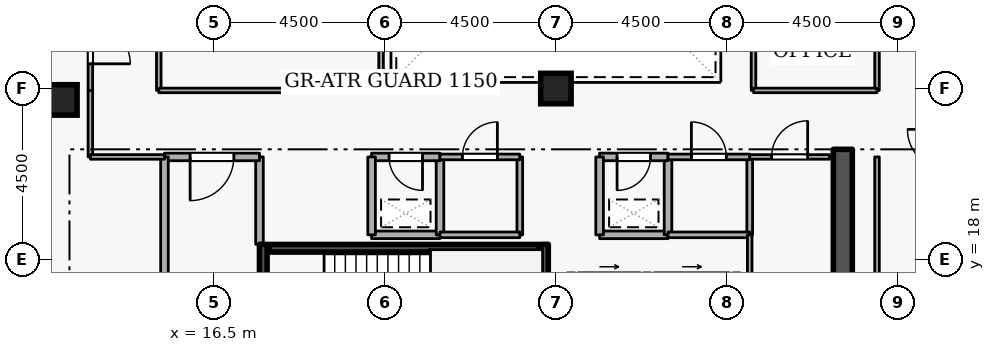
"""IFC4 building model, lengths in metres.
Left out: names, types, materials, properties, quantities, classifications, styles, units other than length and angle.
Written with IfcOpenShell. Run it as: python <this file> out.ifc"""

import sys

from ifc_helpers import new_model, si_unit, direction, frame, frame_2d, origin, origin_2d, place, context, subcontext, project, spatial, rectangle, extrude, element, fill, save


model = new_model("IFC4")
c1 = context("Model", 3, precision=1e-05, world=origin(), true_north=direction((0.0, 1.0)))
c2 = subcontext(c1, "Body", "Model", "MODEL_VIEW")
j1 = project(units=[si_unit("LENGTHUNIT", "METRE"), si_unit("PLANEANGLEUNIT", "RADIAN")], contexts=[c1])
p1 = place(None, origin())
s1 = spatial("IfcSite", under=j1, at=p1, CompositionType="ELEMENT")
p2 = place(p1, origin())
s2 = spatial("IfcBuilding", under=s1, at=p2, CompositionType="ELEMENT")
p3 = place(p2, frame((0.0, 0.0, 258.3)))
s3 = spatial("IfcBuildingStorey", under=s2, at=p3, CompositionType="ELEMENT", Elevation=258.3)
p4 = place(p3, frame((33.05, 15.1, 0.0), z_axis=(0.0, 0.0, 1.0), x_axis=(0.0, 1.0, 0.0)))
e1 = element("IfcWall", 1, at=p4, inside=s3, PredefinedType="SHEAR", context=c2, shape_type="SweptSolid", body=[
    extrude(rectangle(XDim=5.8, YDim=0.5, at=frame_2d((2.9, 0.0))), origin(), (0.0, 0.0, 1.0), 3.6),
])
for number, where, z_axis, x_axis in (
    (2, (12.5, 22.2, 0.0), (0.0, 0.0, 1.0), (1.0, 0.0, 0.0)),
    (3, (25.5, 22.5, 0.0), (0.0, 0.0, 1.0), (1.0, 0.0, 0.0)),
):
    element("IfcColumn", number, at=place(p3, frame(where, z_axis=z_axis, x_axis=x_axis)), inside=s3, PredefinedType="COLUMN", context=c2, shape_type="SweptSolid", body=[
        extrude(rectangle(XDim=0.8, YDim=0.8, at=origin_2d()), origin(), (0.0, 0.0, 1.0), 3.6),
    ])
p5 = place(p3, frame((26.08, 17.55, 0.0), z_axis=(0.0, 0.0, 1.0), x_axis=(1.0, 0.0, 0.0)))
e4 = element("IfcWall", 4, at=p5, inside=s3, PredefinedType="STANDARD", context=c2, shape_type="SweptSolid", body=[
    extrude(rectangle(XDim=1.64, YDim=0.2, at=frame_2d((0.82, 0.0))), origin(), (0.0, 0.0, 1.0), 3.34),
])
p6 = place(p5, frame((0.31, 0.0, 0.0)))
e5 = element("IfcOpeningElement", 5, at=p6, cuts=e4, PredefinedType="OPENING", context=c2, shape_type="SweptSolid", body=[
    extrude(rectangle(XDim=1.02, YDim=2.06, at=frame_2d((0.51, 1.03))), frame((0.0, 0.11, 0.0), z_axis=(0.0, -1.0, 0.0), x_axis=(1.0, 0.0, 0.0)), (0.0, 0.0, 1.0), 0.22),
])
p7 = place(p3, frame((28.08, 17.55, 0.0), z_axis=(0.0, 0.0, 1.0), x_axis=(1.0, 0.0, 0.0)))
e6 = element("IfcWall", 6, at=p7, inside=s3, PredefinedType="STANDARD", context=c2, shape_type="SweptSolid", body=[
    extrude(rectangle(XDim=1.99, YDim=0.2, at=frame_2d((0.995, 0.0))), origin(), (0.0, 0.0, 1.0), 3.34),
])
p8 = place(p7, frame((0.485, 0.0, 0.0)))
e7 = element("IfcOpeningElement", 7, at=p8, cuts=e6, PredefinedType="OPENING", context=c2, shape_type="SweptSolid", body=[
    extrude(rectangle(XDim=1.02, YDim=2.06, at=frame_2d((0.51, 1.03))), frame((0.0, 0.11, 0.0), z_axis=(0.0, -1.0, 0.0), x_axis=(1.0, 0.0, 0.0)), (0.0, 0.0, 1.0), 0.22),
])
p9 = place(p3, frame((17.8, 15.05, 0.0), z_axis=(0.0, 0.0, 1.0), x_axis=(0.0, 1.0, 0.0)))
e8 = element("IfcWall", 8, at=p9, inside=s3, PredefinedType="SHEAR", context=c2, shape_type="SweptSolid", body=[
    extrude(rectangle(XDim=3.35, YDim=0.2, at=frame_2d((1.675, 0.0))), origin(), (0.0, 0.0, 1.0), 3.6),
])
p10 = place(p9, frame((1.125, 0.0, 0.0)))
e9 = element("IfcOpeningElement", 9, at=p10, cuts=e8, PredefinedType="OPENING", context=c2, shape_type="SweptSolid", body=[
    extrude(rectangle(XDim=1.1, YDim=2.1, at=frame_2d((0.55, 1.05))), frame((0.0, 0.11, 0.0), z_axis=(0.0, -1.0, 0.0), x_axis=(1.0, 0.0, 0.0)), (0.0, 0.0, 1.0), 0.22),
])
p11 = place(p3, frame((25.2, 18.4, 0.0), z_axis=(0.0, 0.0, 1.0), x_axis=(0.0, -1.0, 0.0)))
e10 = element("IfcWall", 10, at=p11, inside=s3, PredefinedType="SHEAR", context=c2, shape_type="SweptSolid", body=[
    extrude(rectangle(XDim=3.35, YDim=0.2, at=frame_2d((1.675, 0.0))), origin(), (0.0, 0.0, 1.0), 3.6),
])
p12 = place(p3, frame((25.05, 18.297, 0.0), z_axis=(0.0, 0.0, 1.0), x_axis=(-1.0, 0.0, 0.0)))
e11 = element("IfcWall", 11, at=p12, inside=s3, PredefinedType="SHEAR", context=c2, shape_type="SweptSolid", body=[
    extrude(rectangle(XDim=7.1, YDim=0.2, at=frame_2d((3.55, 0.0))), origin(), (0.0, 0.0, 1.0), 3.6),
])
p13 = place(p3, frame((17.7, 18.4, 0.0), z_axis=(0.0, 0.0, 1.0), x_axis=(0.0, 1.0, 0.0)))
e12 = element("IfcWall", 12, at=p13, inside=s3, PredefinedType="STANDARD", context=c2, shape_type="SweptSolid", body=[
    extrude(rectangle(XDim=2.3, YDim=0.2, at=frame_2d((1.15, 0.0))), origin(), (0.0, 0.0, 1.0), 2.545),
])
p14 = place(p3, frame((17.7, 20.7, 0.0), z_axis=(0.0, 0.0, 1.0), x_axis=(-1.0, 0.0, 0.0)))
e13 = element("IfcWall", 13, at=p14, inside=s3, PredefinedType="STANDARD", context=c2, shape_type="SweptSolid", body=[
    extrude(rectangle(XDim=2.5, YDim=0.2, at=frame_2d((1.25, 0.0))), origin(), (0.0, 0.0, 1.0), 3.34),
])
p15 = place(p14, frame((0.675, 0.0, 0.0)))
e14 = element("IfcOpeningElement", 14, at=p15, cuts=e13, PredefinedType="OPENING", context=c2, shape_type="SweptSolid", body=[
    extrude(rectangle(XDim=1.15, YDim=2.1, at=frame_2d((0.575, 1.05))), frame((0.0, 0.11, 0.0), z_axis=(0.0, -1.0, 0.0), x_axis=(1.0, 0.0, 0.0)), (0.0, 0.0, 1.0), 0.22),
])
p16 = place(p3, frame((15.2, 20.7, 0.0), z_axis=(0.0, 0.0, 1.0), x_axis=(0.0, -1.0, 0.0)))
e15 = element("IfcWall", 15, at=p16, inside=s3, PredefinedType="STANDARD", context=c2, shape_type="SweptSolid", body=[
    extrude(rectangle(XDim=5.7, YDim=0.2, at=frame_2d((2.85, 0.0))), origin(), (0.0, 0.0, 1.0), 3.34),
])
p17 = place(p3, frame((26.65, 18.65, 0.0), z_axis=(0.0, 0.0, 1.0), x_axis=(1.0, 0.0, 0.0)))
e16 = element("IfcWall", 16, at=p17, inside=s3, PredefinedType="STANDARD", context=c2, shape_type="SweptSolid", body=[
    extrude(rectangle(XDim=1.8, YDim=0.2, at=frame_2d((0.9, 0.0))), origin(), (0.0, 0.0, 1.0), 3.34),
])
p18 = place(p3, frame((28.45, 18.65, 0.0), z_axis=(0.0, 0.0, 1.0), x_axis=(0.0, 1.0, 0.0)))
e17 = element("IfcWall", 17, at=p18, inside=s3, PredefinedType="STANDARD", context=c2, shape_type="SweptSolid", body=[
    extrude(rectangle(XDim=2.05, YDim=0.2, at=frame_2d((1.025, 0.0))), origin(), (0.0, 0.0, 1.0), 3.34),
])
p19 = place(p3, frame((28.45, 20.7, 0.0), z_axis=(0.0, 0.0, 1.0), x_axis=(-1.0, 0.0, 0.0)))
e18 = element("IfcWall", 18, at=p19, inside=s3, PredefinedType="STANDARD", context=c2, shape_type="SweptSolid", body=[
    extrude(rectangle(XDim=1.8, YDim=0.2, at=frame_2d((0.9, 0.0))), origin(), (0.0, 0.0, 1.0), 3.34),
])
p20 = place(p19, frame((0.46, 0.0, 0.0)))
e19 = element("IfcOpeningElement", 19, at=p20, cuts=e18, PredefinedType="OPENING", context=c2, shape_type="SweptSolid", body=[
    extrude(rectangle(XDim=0.88, YDim=2.04, at=frame_2d((0.44, 1.02))), frame((0.0, 0.11, 0.0), z_axis=(0.0, -1.0, 0.0), x_axis=(1.0, 0.0, 0.0)), (0.0, 0.0, 1.0), 0.22),
])
p21 = place(p3, frame((26.65, 20.7, 0.0), z_axis=(0.0, 0.0, 1.0), x_axis=(0.0, -1.0, 0.0)))
e20 = element("IfcWall", 20, at=p21, inside=s3, PredefinedType="STANDARD", context=c2, shape_type="SweptSolid", body=[
    extrude(rectangle(XDim=2.05, YDim=0.2, at=frame_2d((1.025, 0.0))), origin(), (0.0, 0.0, 1.0), 3.34),
])
p22 = place(p3, frame((20.65, 18.65, 0.0), z_axis=(0.0, 0.0, 1.0), x_axis=(1.0, 0.0, 0.0)))
e21 = element("IfcWall", 21, at=p22, inside=s3, PredefinedType="STANDARD", context=c2, shape_type="SweptSolid", body=[
    extrude(rectangle(XDim=1.8, YDim=0.2, at=frame_2d((0.9, 0.0))), origin(), (0.0, 0.0, 1.0), 3.34),
])
p23 = place(p3, frame((22.45, 18.65, 0.0), z_axis=(0.0, 0.0, 1.0), x_axis=(0.0, 1.0, 0.0)))
e22 = element("IfcWall", 22, at=p23, inside=s3, PredefinedType="STANDARD", context=c2, shape_type="SweptSolid", body=[
    extrude(rectangle(XDim=2.05, YDim=0.2, at=frame_2d((1.025, 0.0))), origin(), (0.0, 0.0, 1.0), 3.34),
])
p24 = place(p3, frame((22.45, 20.7, 0.0), z_axis=(0.0, 0.0, 1.0), x_axis=(-1.0, 0.0, 0.0)))
e23 = element("IfcWall", 23, at=p24, inside=s3, PredefinedType="STANDARD", context=c2, shape_type="SweptSolid", body=[
    extrude(rectangle(XDim=1.8, YDim=0.2, at=frame_2d((0.9, 0.0))), origin(), (0.0, 0.0, 1.0), 3.34),
])
p25 = place(p24, frame((0.46, 0.0, 0.0)))
e24 = element("IfcOpeningElement", 24, at=p25, cuts=e23, PredefinedType="OPENING", context=c2, shape_type="SweptSolid", body=[
    extrude(rectangle(XDim=0.88, YDim=2.04, at=frame_2d((0.44, 1.02))), frame((0.0, 0.11, 0.0), z_axis=(0.0, -1.0, 0.0), x_axis=(1.0, 0.0, 0.0)), (0.0, 0.0, 1.0), 0.22),
])
p26 = place(p3, frame((20.65, 20.7, 0.0), z_axis=(0.0, 0.0, 1.0), x_axis=(0.0, -1.0, 0.0)))
e25 = element("IfcWall", 25, at=p26, inside=s3, PredefinedType="STANDARD", context=c2, shape_type="SweptSolid", body=[
    extrude(rectangle(XDim=2.05, YDim=0.2, at=frame_2d((1.025, 0.0))), origin(), (0.0, 0.0, 1.0), 3.34),
])
p27 = place(p3, frame((24.55, 20.7, 0.0), z_axis=(0.0, 0.0, 1.0), x_axis=(0.0, -1.0, 0.0)))
e26 = element("IfcWall", 26, at=p27, inside=s3, PredefinedType="PARTITIONING", context=c2, shape_type="SweptSolid", body=[
    extrude(rectangle(XDim=2.05, YDim=0.15, at=frame_2d((1.025, 0.0))), origin(), (0.0, 0.0, 1.0), 3.34),
])
p28 = place(p3, frame((24.55, 18.65, 0.0), z_axis=(0.0, 0.0, 1.0), x_axis=(-1.0, 0.0, 0.0)))
e27 = element("IfcWall", 27, at=p28, inside=s3, PredefinedType="PARTITIONING", context=c2, shape_type="SweptSolid", body=[
    extrude(rectangle(XDim=2.1, YDim=0.15, at=frame_2d((1.05, 0.0))), origin(), (0.0, 0.0, 1.0), 3.34),
])
p29 = place(p3, frame((22.45, 20.7, 0.0), z_axis=(0.0, 0.0, 1.0), x_axis=(1.0, 0.0, 0.0)))
e28 = element("IfcWall", 28, at=p29, inside=s3, PredefinedType="PARTITIONING", context=c2, shape_type="SweptSolid", body=[
    extrude(rectangle(XDim=2.1, YDim=0.15, at=frame_2d((1.05, 0.0))), origin(), (0.0, 0.0, 1.0), 3.34),
])
p30 = place(p29, frame((0.59, 0.0, 0.0)))
e29 = element("IfcOpeningElement", 29, at=p30, cuts=e28, PredefinedType="OPENING", context=c2, shape_type="SweptSolid", body=[
    extrude(rectangle(XDim=0.92, YDim=2.08, at=frame_2d((0.46, 1.04))), frame((0.0, 0.085, 0.0), z_axis=(0.0, -1.0, 0.0), x_axis=(1.0, 0.0, 0.0)), (0.0, 0.0, 1.0), 0.17),
])
p31 = place(p3, frame((30.6, 20.7, 0.0), z_axis=(0.0, 0.0, 1.0), x_axis=(0.0, -1.0, 0.0)))
e30 = element("IfcWall", 30, at=p31, inside=s3, PredefinedType="PARTITIONING", context=c2, shape_type="SweptSolid", body=[
    extrude(rectangle(XDim=2.05, YDim=0.15, at=frame_2d((1.025, 0.0))), origin(), (0.0, 0.0, 1.0), 3.34),
])
p32 = place(p3, frame((30.6, 18.65, 0.0), z_axis=(0.0, 0.0, 1.0), x_axis=(-1.0, 0.0, 0.0)))
e31 = element("IfcWall", 31, at=p32, inside=s3, PredefinedType="PARTITIONING", context=c2, shape_type="SweptSolid", body=[
    extrude(rectangle(XDim=2.15, YDim=0.15, at=frame_2d((1.075, 0.0))), origin(), (0.0, 0.0, 1.0), 3.34),
])
p33 = place(p3, frame((28.45, 20.7, 0.0), z_axis=(0.0, 0.0, 1.0), x_axis=(1.0, 0.0, 0.0)))
e32 = element("IfcWall", 32, at=p33, inside=s3, PredefinedType="PARTITIONING", context=c2, shape_type="SweptSolid", body=[
    extrude(rectangle(XDim=2.15, YDim=0.15, at=frame_2d((1.075, 0.0))), origin(), (0.0, 0.0, 1.0), 3.34),
])
p34 = place(p33, frame((0.615, 0.0, 0.0)))
e33 = element("IfcOpeningElement", 33, at=p34, cuts=e32, PredefinedType="OPENING", context=c2, shape_type="SweptSolid", body=[
    extrude(rectangle(XDim=0.92, YDim=2.08, at=frame_2d((0.46, 1.04))), frame((0.0, 0.085, 0.0), z_axis=(0.0, -1.0, 0.0), x_axis=(1.0, 0.0, 0.0)), (0.0, 0.0, 1.0), 0.17),
])
p35 = place(p3, frame((30.6, 15.1, 0.0), z_axis=(0.0, 0.0, 1.0), x_axis=(0.0, 1.0, 0.0)))
e34 = element("IfcWall", 34, at=p35, inside=s3, PredefinedType="PARTITIONING", context=c2, shape_type="SweptSolid", body=[
    extrude(rectangle(XDim=3.55, YDim=0.12, at=frame_2d((1.775, 0.0))), origin(), (0.0, 0.0, 1.0), 3.34),
])
p36 = place(p3, frame((30.6, 20.7, 0.0), z_axis=(0.0, 0.0, 1.0), x_axis=(1.0, 0.0, 0.0)))
e35 = element("IfcWall", 35, at=p36, inside=s3, PredefinedType="PARTITIONING", context=c2, shape_type="SweptSolid", body=[
    extrude(rectangle(XDim=2.1, YDim=0.12, at=frame_2d((1.05, 0.0))), origin(), (0.0, 0.0, 1.0), 3.34),
])
p37 = place(p36, frame((0.575, 0.0, 0.0)))
e36 = element("IfcOpeningElement", 36, at=p37, cuts=e35, PredefinedType="OPENING", context=c2, shape_type="SweptSolid", body=[
    extrude(rectangle(XDim=0.95, YDim=2.1, at=frame_2d((0.475, 1.05))), frame((0.0, 0.07, 0.0), z_axis=(0.0, -1.0, 0.0), x_axis=(1.0, 0.0, 0.0)), (0.0, 0.0, 1.0), 0.14),
])
p38 = place(p3, frame((33.95, 20.7, 0.0), z_axis=(0.0, 0.0, 1.0), x_axis=(0.0, -1.0, 0.0)))
e37 = element("IfcWall", 37, at=p38, inside=s3, PredefinedType="PARTITIONING", context=c2, shape_type="SweptSolid", body=[
    extrude(rectangle(XDim=5.9, YDim=0.12, at=frame_2d((2.95, 0.0))), origin(), (0.0, 0.0, 1.0), 3.34),
])
p39 = place(p3, frame((13.25, 24.9, 0.0), z_axis=(0.0, 0.0, 1.0), x_axis=(0.0, -1.0, 0.0)))
e38 = element("IfcWall", 38, at=p39, inside=s3, PredefinedType="PARTITIONING", context=c2, shape_type="SweptSolid", body=[
    extrude(rectangle(XDim=2.45, YDim=0.12, at=frame_2d((1.225, 0.0))), origin(), (0.0, 0.0, 1.0), 3.34),
])
p40 = place(p39, frame((0.7, 0.0, 0.0)))
e39 = element("IfcOpeningElement", 39, at=p40, cuts=e38, PredefinedType="OPENING", context=c2, shape_type="SweptSolid", body=[
    extrude(rectangle(XDim=1.05, YDim=2.1, at=frame_2d((0.525, 1.05))), frame((0.0, 0.07, 0.0), z_axis=(0.0, -1.0, 0.0), x_axis=(1.0, 0.0, 0.0)), (0.0, 0.0, 1.0), 0.14),
])
p41 = place(p3, frame((13.25, 22.45, 0.0), z_axis=(0.0, 0.0, 1.0), x_axis=(0.0, -1.0, 0.0)))
e40 = element("IfcWall", 40, at=p41, inside=s3, PredefinedType="PARTITIONING", context=c2, shape_type="SweptSolid", body=[
    extrude(rectangle(XDim=1.75, YDim=0.12, at=frame_2d((0.875, 0.0))), origin(), (0.0, 0.0, 1.0), 3.34),
])
p42 = place(p3, frame((13.25, 20.7, 0.0), z_axis=(0.0, 0.0, 1.0), x_axis=(1.0, 0.0, 0.0)))
e41 = element("IfcWall", 41, at=p42, inside=s3, PredefinedType="PARTITIONING", context=c2, shape_type="SweptSolid", body=[
    extrude(rectangle(XDim=1.95, YDim=0.12, at=frame_2d((0.975, 0.0))), origin(), (0.0, 0.0, 1.0), 3.34),
])
p43 = place(p3, frame((15.05, 22.45, 0.0), z_axis=(0.0, 0.0, 1.0), x_axis=(0.0, 1.0, 0.0)))
e42 = element("IfcWall", 42, at=p43, inside=s3, PredefinedType="PARTITIONING", context=c2, shape_type="SweptSolid", body=[
    extrude(rectangle(XDim=9.1, YDim=0.12, at=frame_2d((4.55, 0.0))), origin(), (0.0, 0.0, 1.0), 3.34),
])
p44 = place(p43, frame((4.075, 0.0, 0.0)))
e43 = element("IfcOpeningElement", 43, at=p44, cuts=e42, PredefinedType="OPENING", context=c2, shape_type="SweptSolid", body=[
    extrude(rectangle(XDim=0.95, YDim=2.1, at=frame_2d((0.475, 1.05))), frame((0.0, 0.07, 0.0), z_axis=(0.0, -1.0, 0.0), x_axis=(1.0, 0.0, 0.0)), (0.0, 0.0, 1.0), 0.14),
])
p45 = place(p3, frame((20.9, 31.55, 0.0), z_axis=(0.0, 0.0, 1.0), x_axis=(0.0, -1.0, 0.0)))
e44 = element("IfcWall", 44, at=p45, inside=s3, PredefinedType="PARTITIONING", context=c2, shape_type="SweptSolid", body=[
    extrude(rectangle(XDim=9.1, YDim=0.12, at=frame_2d((4.55, 0.0))), origin(), (0.0, 0.0, 1.0), 3.34),
])
p46 = place(p3, frame((20.9, 22.45, 0.0), z_axis=(0.0, 0.0, 1.0), x_axis=(-1.0, 0.0, 0.0)))
e45 = element("IfcWall", 45, at=p46, inside=s3, PredefinedType="PARTITIONING", context=c2, shape_type="SweptSolid", body=[
    extrude(rectangle(XDim=5.85, YDim=0.12, at=frame_2d((2.925, 0.0))), origin(), (0.0, 0.0, 1.0), 3.34),
])
p47 = place(p3, frame((30.7, 22.45, 0.0), z_axis=(0.0, 0.0, 1.0), x_axis=(0.0, 1.0, 0.0)))
e46 = element("IfcWall", 46, at=p47, inside=s3, PredefinedType="PARTITIONING", context=c2, shape_type="SweptSolid", body=[
    extrude(rectangle(XDim=9.1, YDim=0.12, at=frame_2d((4.55, 0.0))), origin(), (0.0, 0.0, 1.0), 3.34),
])
p48 = place(p3, frame((33.95, 31.55, 0.0), z_axis=(0.0, 0.0, 1.0), x_axis=(0.0, -1.0, 0.0)))
e47 = element("IfcWall", 47, at=p48, inside=s3, PredefinedType="PARTITIONING", context=c2, shape_type="SweptSolid", body=[
    extrude(rectangle(XDim=9.1, YDim=0.12, at=frame_2d((4.55, 0.0))), origin(), (0.0, 0.0, 1.0), 3.34),
])
p49 = place(p48, frame((4.075, 0.0, 0.0)))
e48 = element("IfcOpeningElement", 48, at=p49, cuts=e47, PredefinedType="OPENING", context=c2, shape_type="SweptSolid", body=[
    extrude(rectangle(XDim=0.95, YDim=2.1, at=frame_2d((0.475, 1.05))), frame((0.0, 0.07, 0.0), z_axis=(0.0, -1.0, 0.0), x_axis=(1.0, 0.0, 0.0)), (0.0, 0.0, 1.0), 0.14),
])
p50 = place(p3, frame((33.95, 22.45, 0.0), z_axis=(0.0, 0.0, 1.0), x_axis=(-1.0, 0.0, 0.0)))
e49 = element("IfcWall", 49, at=p50, inside=s3, PredefinedType="PARTITIONING", context=c2, shape_type="SweptSolid", body=[
    extrude(rectangle(XDim=3.25, YDim=0.12, at=frame_2d((1.625, 0.0))), origin(), (0.0, 0.0, 1.0), 3.34),
])
p51 = place(p15, origin())
e50 = element("IfcDoor", 50, at=p51, inside=s3, OperationType="SINGLE_SWING_RIGHT", PredefinedType="DOOR", context=c2, shape_type="SweptSolid", body=[
    extrude(rectangle(XDim=1.15, YDim=2.1, at=frame_2d((0.575, 1.05))), frame((0.0, 0.025, 0.0), z_axis=(0.0, -1.0, 0.0), x_axis=(1.0, 0.0, 0.0)), (0.0, 0.0, 1.0), 0.05),
])
fill(e14, e50)
p52 = place(p20, origin())
e51 = element("IfcDoor", 51, at=p52, inside=s3, OperationType="SINGLE_SWING_RIGHT", PredefinedType="DOOR", context=c2, shape_type="SweptSolid", body=[
    extrude(rectangle(XDim=0.88, YDim=2.04, at=frame_2d((0.44, 1.02))), frame((0.0, 0.025, 0.0), z_axis=(0.0, -1.0, 0.0), x_axis=(1.0, 0.0, 0.0)), (0.0, 0.0, 1.0), 0.05),
])
fill(e19, e51)
p53 = place(p25, origin())
e52 = element("IfcDoor", 52, at=p53, inside=s3, OperationType="SINGLE_SWING_LEFT", PredefinedType="DOOR", context=c2, shape_type="SweptSolid", body=[
    extrude(rectangle(XDim=0.88, YDim=2.04, at=frame_2d((0.44, 1.02))), frame((0.0, 0.025, 0.0), z_axis=(0.0, -1.0, 0.0), x_axis=(1.0, 0.0, 0.0)), (0.0, 0.0, 1.0), 0.05),
])
fill(e24, e52)
p54 = place(p30, origin())
e53 = element("IfcDoor", 53, at=p54, inside=s3, OperationType="SINGLE_SWING_RIGHT", PredefinedType="DOOR", context=c2, shape_type="SweptSolid", body=[
    extrude(rectangle(XDim=0.92, YDim=2.08, at=frame_2d((0.46, 1.04))), frame((0.0, 0.025, 0.0), z_axis=(0.0, -1.0, 0.0), x_axis=(1.0, 0.0, 0.0)), (0.0, 0.0, 1.0), 0.05),
])
fill(e29, e53)
p55 = place(p34, origin())
e54 = element("IfcDoor", 54, at=p55, inside=s3, OperationType="SINGLE_SWING_LEFT", PredefinedType="DOOR", context=c2, shape_type="SweptSolid", body=[
    extrude(rectangle(XDim=0.92, YDim=2.08, at=frame_2d((0.46, 1.04))), frame((0.0, 0.025, 0.0), z_axis=(0.0, -1.0, 0.0), x_axis=(1.0, 0.0, 0.0)), (0.0, 0.0, 1.0), 0.05),
])
fill(e33, e54)
p56 = place(p37, origin())
e55 = element("IfcDoor", 55, at=p56, inside=s3, OperationType="SINGLE_SWING_RIGHT", PredefinedType="DOOR", context=c2, shape_type="SweptSolid", body=[
    extrude(rectangle(XDim=0.95, YDim=2.1, at=frame_2d((0.475, 1.05))), frame((0.0, 0.025, 0.0), z_axis=(0.0, -1.0, 0.0), x_axis=(1.0, 0.0, 0.0)), (0.0, 0.0, 1.0), 0.05),
])
fill(e36, e55)
p57 = place(p40, origin())
e56 = element("IfcDoor", 56, at=p57, inside=s3, OperationType="SINGLE_SWING_RIGHT", PredefinedType="DOOR", context=c2, shape_type="SweptSolid", body=[
    extrude(rectangle(XDim=1.05, YDim=2.1, at=frame_2d((0.525, 1.05))), frame((0.0, 0.025, 0.0), z_axis=(0.0, -1.0, 0.0), x_axis=(1.0, 0.0, 0.0)), (0.0, 0.0, 1.0), 0.05),
])
fill(e39, e56)
save(model, sys.argv[1])
